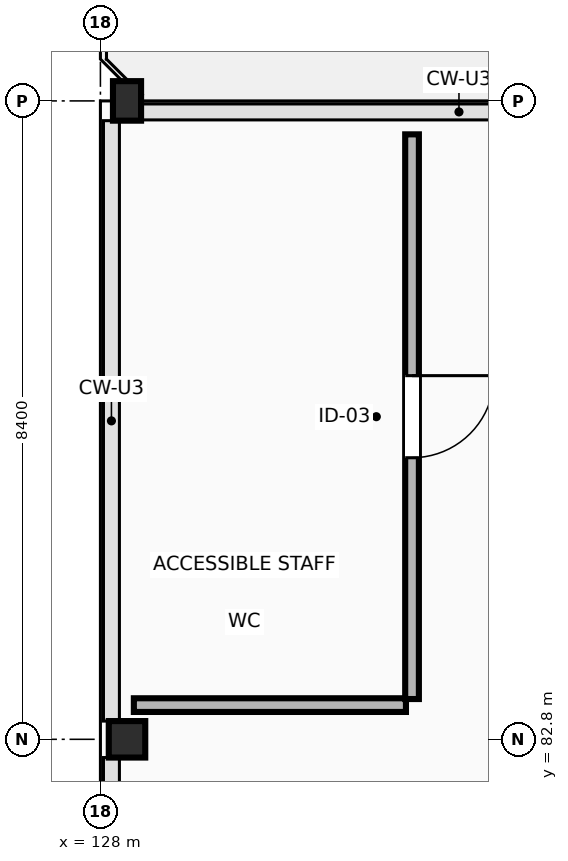
"""IFC4 building model, lengths in metres.
Left out: names, types, materials, properties, quantities, classifications, styles, units other than length and angle.
Written with IfcOpenShell. Run it as: python <this file> out.ifc"""

import sys

from ifc_helpers import new_model, si_unit, direction, frame, frame_2d, origin, origin_2d, place, context, subcontext, project, spatial, rectangle, extrude, element, fill, save


model = new_model("IFC4")
c1 = context("Model", 3, precision=1e-05, world=origin(), true_north=direction((0.0, 1.0)))
c2 = subcontext(c1, "Body", "Model", "MODEL_VIEW")
j1 = project(units=[si_unit("LENGTHUNIT", "METRE"), si_unit("PLANEANGLEUNIT", "RADIAN")], contexts=[c1])
p1 = place(None, origin())
s1 = spatial("IfcSite", under=j1, at=p1, CompositionType="ELEMENT")
p2 = place(p1, origin())
s2 = spatial("IfcBuilding", under=s1, at=p2, CompositionType="ELEMENT")
p3 = place(p2, frame((0.0, 0.0, 9.6)))
s3 = spatial("IfcBuildingStorey", under=s2, at=p3, CompositionType="ELEMENT", Elevation=9.6)
p4 = place(p3, frame((128.35, 82.8, 0.0), z_axis=(0.0, 0.0, 1.0), x_axis=(1.0, 0.0, 0.0)))
e1 = element("IfcColumn", 1, at=p4, inside=s3, PredefinedType="COLUMN", context=c2, shape_type="SweptSolid", body=[
    extrude(rectangle(XDim=0.48, YDim=0.48, at=origin_2d()), origin(), (0.0, 0.0, 1.0), 4.2),
])
p5 = place(p3, frame((128.35, 91.2, 0.0), z_axis=(0.0, 0.0, 1.0), x_axis=(1.0, 0.0, 0.0)))
e2 = element("IfcColumn", 2, at=p5, inside=s3, PredefinedType="COLUMN", context=c2, shape_type="SweptSolid", body=[
    extrude(rectangle(XDim=0.37, YDim=0.52, at=origin_2d()), origin(), (0.0, 0.0, 1.0), 4.2),
])
p6 = place(p3, frame((132.02, 83.25, 0.0), z_axis=(0.0, 0.0, 1.0), x_axis=(-1.0, 0.0, 0.0)))
e3 = element("IfcWall", 3, at=p6, inside=s3, PredefinedType="PARTITIONING", context=c2, shape_type="SweptSolid", body=[
    extrude(rectangle(XDim=3.58, YDim=0.18, at=frame_2d((1.79, 0.0))), origin(), (0.0, 0.0, 1.0), 3.255),
])
p7 = place(p3, frame((132.1, 90.76, 0.0), z_axis=(0.0, 0.0, 1.0), x_axis=(0.0, -1.0, 0.0)))
e4 = element("IfcWall", 4, at=p7, inside=s3, PredefinedType="PARTITIONING", context=c2, shape_type="SweptSolid", body=[
    extrude(rectangle(XDim=7.43, YDim=0.18, at=frame_2d((3.715, 0.0))), origin(), (0.0, 0.0, 1.0), 3.92),
])
p8 = place(p7, frame((3.175, 0.0, 0.0)))
e5 = element("IfcOpeningElement", 5, at=p8, cuts=e4, PredefinedType="OPENING", context=c2, shape_type="SweptSolid", body=[
    extrude(rectangle(XDim=1.08, YDim=2.2, at=frame_2d((0.54, 1.1))), frame((0.0, 0.1, 0.0), z_axis=(0.0, -1.0, 0.0), x_axis=(1.0, 0.0, 0.0)), (0.0, 0.0, 1.0), 0.2),
])
p9 = place(p8, origin())
e6 = element("IfcDoor", 6, at=p9, inside=s3, OperationType="SINGLE_SWING_LEFT", PredefinedType="DOOR", context=c2, shape_type="SweptSolid", body=[
    extrude(rectangle(XDim=1.08, YDim=2.2, at=frame_2d((0.54, 1.1))), frame((0.0, 0.025, 0.0), z_axis=(0.0, -1.0, 0.0), x_axis=(1.0, 0.0, 0.0)), (0.0, 0.0, 1.0), 0.05),
])
fill(e5, e6)
save(model, sys.argv[1])
